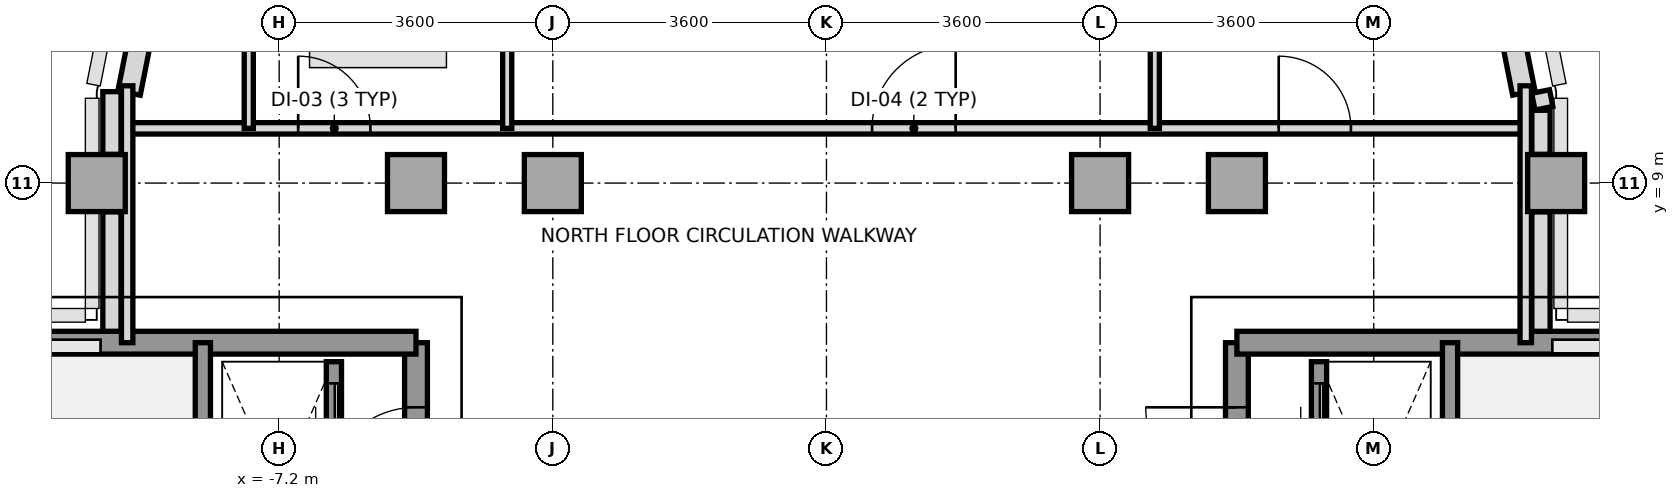
"""IFC4 building model, lengths in metres.
Left out: names, types, materials, properties, quantities, classifications, styles, units other than length and angle.
Written with IfcOpenShell. Run it as: python <this file> out.ifc"""

import sys

from ifc_helpers import new_model, si_unit, direction, frame, frame_2d, origin, origin_2d, place, context, subcontext, project, spatial, rectangle, extrude, source, transform, mapped, element, fill, save


model = new_model("IFC4")
c1 = context("Model", 3, precision=1e-05, world=origin(), true_north=direction((0.0, 1.0)))
c2 = subcontext(c1, "Body", "Model", "MODEL_VIEW")
j1 = project(units=[si_unit("LENGTHUNIT", "METRE"), si_unit("PLANEANGLEUNIT", "RADIAN")], contexts=[c1])
p1 = place(None, origin())
s1 = spatial("IfcSite", under=j1, at=p1, CompositionType="ELEMENT")
p2 = place(p1, origin())
s2 = spatial("IfcBuilding", under=s1, at=p2, CompositionType="ELEMENT")
p3 = place(p2, frame((0.0, 0.0, 258.8)))
s3 = spatial("IfcBuildingStorey", under=s2, at=p3, CompositionType="ELEMENT", Elevation=258.8)
m1 = source(origin(), c2, "Body", "SweptSolid", [
    extrude(rectangle(XDim=0.75, YDim=0.75, at=origin_2d()), origin(), (0.0, 0.0, 1.0), 3.01),
])
for number, where, z_axis, x_axis in (
    (1, (-9.6, 9.0, 0.0), (0.0, 0.0, 1.0), (1.0, 0.0, 0.0)),
    (2, (-5.4, 9.0, 0.0), (0.0, 0.0, 1.0), (1.0, 0.0, 0.0)),
    (3, (-3.6, 9.0, 0.0), (0.0, 0.0, 1.0), (1.0, 0.0, 0.0)),
    (4, (3.6, 9.0, 0.0), (0.0, 0.0, 1.0), (1.0, 0.0, 0.0)),
    (5, (5.4, 9.0, 0.0), (0.0, 0.0, 1.0), (1.0, 0.0, 0.0)),
    (6, (9.6, 9.0, 0.0), (0.0, 0.0, 1.0), (1.0, 0.0, 0.0)),
):
    element("IfcColumn", number, at=place(p3, frame(where, z_axis=z_axis, x_axis=x_axis)), inside=s3, PredefinedType="COLUMN", context=c2, shape_type="MappedRepresentation", body=[
        mapped(m1, transform((0.0, 0.0, 0.0), x_axis=(1.0, 0.0, 0.0), y_axis=(0.0, 1.0, 0.0), z_axis=(0.0, 0.0, 1.0), scale=1.0)),
    ])
for number, where, z_axis, x_axis in (
    (7, (9.175, 10.185, 0.0), (0.0, 0.0, 1.0), (-0.195, 0.981, 0.0)),
    (8, (-8.471, 13.725, 0.0), (0.0, 0.0, 1.0), (-0.195, -0.981, 0.0)),
):
    element("IfcWall", number, at=place(p3, frame(where, z_axis=z_axis, x_axis=x_axis)), inside=s3, PredefinedType="SOLIDWALL", context=c2, shape_type="SweptSolid", body=[
        extrude(rectangle(XDim=3.609, YDim=0.3, at=frame_2d((1.804, 0.0))), origin(), (0.0, 0.0, 1.0), 3.01),
    ])
p4 = place(p3, frame((-9.4, 6.953, 0.0), z_axis=(0.0, 0.0, 1.0), x_axis=(0.0, 1.0, 0.0)))
e9 = element("IfcWall", 9, at=p4, inside=s3, PredefinedType="PARAPET", context=c2, shape_type="SweptSolid", body=[
    extrude(rectangle(XDim=1.669, YDim=0.24, at=frame_2d((0.834, 0.0))), origin(), (0.0, 0.0, 1.0), 1.15),
])
p5 = place(p3, frame((-9.4, 9.378, 0.0), z_axis=(0.0, 0.0, 1.0), x_axis=(0.0, 1.0, 0.0)))
e10 = element("IfcWall", 10, at=p5, inside=s3, PredefinedType="PARAPET", context=c2, shape_type="SweptSolid", body=[
    extrude(rectangle(XDim=0.825, YDim=0.24, at=frame_2d((0.413, 0.0))), origin(), (0.0, 0.0, 1.0), 1.15),
])
p6 = place(p3, frame((9.395, 10.204, 0.0), z_axis=(0.0, 0.0, 1.0), x_axis=(0.194859894132, -0.980831087221, 0.0)))
e11 = element("IfcWall", 11, at=p6, inside=s3, PredefinedType="PARAPET", context=c2, shape_type="SweptSolid", body=[
    extrude(rectangle(XDim=0.224, YDim=0.24, at=frame_2d((0.112, 0.0))), origin(), (0.0, 0.0, 1.0), 1.15),
])
p7 = place(p3, frame((9.4, 9.958, 0.0), z_axis=(0.0, 0.0, 1.0), x_axis=(0.0, -1.0, 0.0)))
e12 = element("IfcWall", 12, at=p7, inside=s3, PredefinedType="PARAPET", context=c2, shape_type="SweptSolid", body=[
    extrude(rectangle(XDim=0.58, YDim=0.24, at=frame_2d((0.29, 0.0))), origin(), (0.0, 0.0, 1.0), 1.15),
])
p8 = place(p3, frame((9.4, 8.622, 0.0), z_axis=(0.0, 0.0, 1.0), x_axis=(0.0, -1.0, 0.0)))
e13 = element("IfcWall", 13, at=p8, inside=s3, PredefinedType="PARAPET", context=c2, shape_type="SweptSolid", body=[
    extrude(rectangle(XDim=1.669, YDim=0.24, at=frame_2d((0.834, 0.0))), origin(), (0.0, 0.0, 1.0), 1.15),
])
p9 = place(p3, frame((-5.4, -5.6, 0.0), z_axis=(0.0, 0.0, 1.0), x_axis=(0.0, 1.0, 0.0)))
e14 = element("IfcWall", 14, at=p9, inside=s3, PredefinedType="SHEAR", context=c2, shape_type="SweptSolid", body=[
    extrude(rectangle(XDim=12.5, YDim=0.3, at=frame_2d((6.25, 0.0))), origin(), (0.0, 0.0, 1.0), 3.01),
])
p10 = place(p9, frame((4.55, 0.0, 0.0)))
e15 = element("IfcOpeningElement", 15, at=p10, cuts=e14, PredefinedType="OPENING", context=c2, shape_type="SweptSolid", body=[
    extrude(rectangle(XDim=1.2, YDim=2.2, at=frame_2d((0.6, 1.1))), frame((0.0, 0.16, 0.0), z_axis=(0.0, -1.0, 0.0), x_axis=(1.0, 0.0, 0.0)), (0.0, 0.0, 1.0), 0.32),
])
p11 = place(p9, frame((10.45, 0.0, 0.0)))
e16 = element("IfcOpeningElement", 16, at=p11, cuts=e14, PredefinedType="OPENING", context=c2, shape_type="SweptSolid", body=[
    extrude(rectangle(XDim=1.2, YDim=2.2, at=frame_2d((0.6, 1.1))), frame((0.0, 0.16, 0.0), z_axis=(0.0, -1.0, 0.0), x_axis=(1.0, 0.0, 0.0)), (0.0, 0.0, 1.0), 0.32),
])
p12 = place(p9, frame((6.86, 0.0, 0.0)))
e17 = element("IfcOpeningElement", 17, at=p12, cuts=e14, PredefinedType="OPENING", context=c2, shape_type="SweptSolid", body=[
    extrude(rectangle(XDim=0.8, YDim=2.1, at=frame_2d((0.4, 1.05))), frame((0.0, 0.16, 0.0), z_axis=(0.0, -1.0, 0.0), x_axis=(1.0, 0.0, 0.0)), (0.0, 0.0, 1.0), 0.32),
])
p13 = place(p3, frame((-12.35, 6.9, 0.0), z_axis=(0.0, 0.0, 1.0), x_axis=(1.0, 0.0, 0.0)))
e18 = element("IfcWall", 18, at=p13, inside=s3, PredefinedType="SHEAR", context=c2, shape_type="SweptSolid", body=[
    extrude(rectangle(XDim=6.95, YDim=0.3, at=frame_2d((3.475, 0.0))), origin(), (0.0, 0.0, 1.0), 3.01),
])
p14 = place(p3, frame((-8.204, -0.016, 0.0), z_axis=(0.0, 0.0, 1.0), x_axis=(0.0, 1.0, 0.0)))
e19 = element("IfcWall", 19, at=p14, inside=s3, PredefinedType="SOLIDWALL", context=c2, shape_type="SweptSolid", body=[
    extrude(rectangle(XDim=6.916, YDim=0.2, at=frame_2d((3.458, 0.0))), origin(), (0.0, 0.0, 1.0), 3.01),
])
p15 = place(p14, frame((0.2, 0.0, 0.0)))
e20 = element("IfcOpeningElement", 20, at=p15, cuts=e19, PredefinedType="OPENING", context=c2, shape_type="SweptSolid", body=[
    extrude(rectangle(XDim=1.2, YDim=2.2, at=frame_2d((0.6, 1.1))), frame((0.0, 0.11, 0.0), z_axis=(0.0, -1.0, 0.0), x_axis=(1.0, 0.0, 0.0)), (0.0, 0.0, 1.0), 0.22),
])
p16 = place(p3, frame((5.4, -5.6, 0.0), z_axis=(0.0, 0.0, 1.0), x_axis=(0.0, 1.0, 0.0)))
e21 = element("IfcWall", 21, at=p16, inside=s3, PredefinedType="SHEAR", context=c2, shape_type="SweptSolid", body=[
    extrude(rectangle(XDim=12.5, YDim=0.3, at=frame_2d((6.25, 0.0))), origin(), (0.0, 0.0, 1.0), 3.01),
])
p17 = place(p16, frame((4.55, 0.0, 0.0)))
e22 = element("IfcOpeningElement", 22, at=p17, cuts=e21, PredefinedType="OPENING", context=c2, shape_type="SweptSolid", body=[
    extrude(rectangle(XDim=1.2, YDim=2.2, at=frame_2d((0.6, 1.1))), frame((0.0, 0.16, 0.0), z_axis=(0.0, -1.0, 0.0), x_axis=(1.0, 0.0, 0.0)), (0.0, 0.0, 1.0), 0.32),
])
p18 = place(p16, frame((10.45, 0.0, 0.0)))
e23 = element("IfcOpeningElement", 23, at=p18, cuts=e21, PredefinedType="OPENING", context=c2, shape_type="SweptSolid", body=[
    extrude(rectangle(XDim=1.2, YDim=2.2, at=frame_2d((0.6, 1.1))), frame((0.0, 0.16, 0.0), z_axis=(0.0, -1.0, 0.0), x_axis=(1.0, 0.0, 0.0)), (0.0, 0.0, 1.0), 0.32),
])
p19 = place(p16, frame((6.86, 0.0, 0.0)))
e24 = element("IfcOpeningElement", 24, at=p19, cuts=e21, PredefinedType="OPENING", context=c2, shape_type="SweptSolid", body=[
    extrude(rectangle(XDim=0.8, YDim=2.1, at=frame_2d((0.4, 1.05))), frame((0.0, 0.16, 0.0), z_axis=(0.0, -1.0, 0.0), x_axis=(1.0, 0.0, 0.0)), (0.0, 0.0, 1.0), 0.32),
])
p20 = place(p16, frame((7.88, 0.0, 0.0)))
e25 = element("IfcOpeningElement", 25, at=p20, cuts=e21, PredefinedType="OPENING", context=c2, shape_type="SweptSolid", body=[
    extrude(rectangle(XDim=0.8, YDim=2.1, at=frame_2d((0.4, 1.05))), frame((0.0, 0.16, 0.0), z_axis=(0.0, -1.0, 0.0), x_axis=(1.0, 0.0, 0.0)), (0.0, 0.0, 1.0), 0.32),
])
p21 = place(p3, frame((5.4, 6.9, 0.0), z_axis=(0.0, 0.0, 1.0), x_axis=(1.0, 0.0, 0.0)))
e26 = element("IfcWall", 26, at=p21, inside=s3, PredefinedType="SHEAR", context=c2, shape_type="SweptSolid", body=[
    extrude(rectangle(XDim=6.95, YDim=0.3, at=frame_2d((3.475, 0.0))), origin(), (0.0, 0.0, 1.0), 3.01),
])
p22 = place(p3, frame((8.204, -0.016, 0.0), z_axis=(0.0, 0.0, 1.0), x_axis=(0.0, 1.0, 0.0)))
e27 = element("IfcWall", 27, at=p22, inside=s3, PredefinedType="SOLIDWALL", context=c2, shape_type="SweptSolid", body=[
    extrude(rectangle(XDim=6.916, YDim=0.2, at=frame_2d((3.458, 0.0))), origin(), (0.0, 0.0, 1.0), 3.01),
])
p23 = place(p22, frame((0.2, 0.0, 0.0)))
e28 = element("IfcOpeningElement", 28, at=p23, cuts=e27, PredefinedType="OPENING", context=c2, shape_type="SweptSolid", body=[
    extrude(rectangle(XDim=1.2, YDim=2.2, at=frame_2d((0.6, 1.1))), frame((0.0, 0.11, 0.0), z_axis=(0.0, -1.0, 0.0), x_axis=(1.0, 0.0, 0.0)), (0.0, 0.0, 1.0), 0.22),
])
p24 = place(p3, frame((-6.48, 4.98, 0.0), z_axis=(0.0, 0.0, 1.0), x_axis=(0.0, 1.0, 0.0)))
e29 = element("IfcWall", 29, at=p24, inside=s3, PredefinedType="SOLIDWALL", context=c2, shape_type="SweptSolid", body=[
    extrude(rectangle(XDim=1.67, YDim=0.2, at=frame_2d((0.835, 0.0))), origin(), (0.0, 0.0, 1.0), 3.01),
])
p25 = place(p24, frame((0.285, 0.0, 0.0)))
e30 = element("IfcOpeningElement", 30, at=p25, cuts=e29, PredefinedType="OPENING", context=c2, shape_type="SweptSolid", body=[
    extrude(rectangle(XDim=1.1, YDim=2.2, at=frame_2d((0.55, 1.1))), frame((0.0, 0.11, 0.0), z_axis=(0.0, -1.0, 0.0), x_axis=(1.0, 0.0, 0.0)), (0.0, 0.0, 1.0), 0.22),
])
p26 = place(p3, frame((6.48, 4.98, 0.0), z_axis=(0.0, 0.0, 1.0), x_axis=(0.0, 1.0, 0.0)))
e31 = element("IfcWall", 31, at=p26, inside=s3, PredefinedType="SOLIDWALL", context=c2, shape_type="SweptSolid", body=[
    extrude(rectangle(XDim=1.67, YDim=0.2, at=frame_2d((0.835, 0.0))), origin(), (0.0, 0.0, 1.0), 3.01),
])
p27 = place(p26, frame((0.285, 0.0, 0.0)))
e32 = element("IfcOpeningElement", 32, at=p27, cuts=e31, PredefinedType="OPENING", context=c2, shape_type="SweptSolid", body=[
    extrude(rectangle(XDim=1.1, YDim=2.2, at=frame_2d((0.55, 1.1))), frame((0.0, 0.11, 0.0), z_axis=(0.0, -1.0, 0.0), x_axis=(1.0, 0.0, 0.0)), (0.0, 0.0, 1.0), 0.22),
])
p28 = place(p3, frame((-9.2, 9.72, 0.0), z_axis=(0.0, 0.0, 1.0), x_axis=(1.0, 0.0, 0.0)))
e33 = element("IfcWall", 33, at=p28, inside=s3, PredefinedType="PARTITIONING", context=c2, shape_type="SweptSolid", body=[
    extrude(rectangle(XDim=18.4, YDim=0.15, at=frame_2d((9.2, 0.0))), origin(), (0.0, 0.0, 1.0), 3.01),
])
p29 = place(p28, frame((2.25, 0.0, 0.0)))
e34 = element("IfcOpeningElement", 34, at=p29, cuts=e33, PredefinedType="OPENING", context=c2, shape_type="SweptSolid", body=[
    extrude(rectangle(XDim=0.95, YDim=2.15, at=frame_2d((0.475, 1.075))), frame((0.0, 0.085, 0.0), z_axis=(0.0, -1.0, 0.0), x_axis=(1.0, 0.0, 0.0)), (0.0, 0.0, 1.0), 0.17),
])
p30 = place(p28, frame((9.8, 0.0, 0.0)))
e35 = element("IfcOpeningElement", 35, at=p30, cuts=e33, PredefinedType="OPENING", context=c2, shape_type="SweptSolid", body=[
    extrude(rectangle(XDim=1.1, YDim=2.2, at=frame_2d((0.55, 1.1))), frame((0.0, 0.085, 0.0), z_axis=(0.0, -1.0, 0.0), x_axis=(1.0, 0.0, 0.0)), (0.0, 0.0, 1.0), 0.17),
])
p31 = place(p28, frame((15.15, 0.0, 0.0)))
e36 = element("IfcOpeningElement", 36, at=p31, cuts=e33, PredefinedType="OPENING", context=c2, shape_type="SweptSolid", body=[
    extrude(rectangle(XDim=0.95, YDim=2.15, at=frame_2d((0.475, 1.075))), frame((0.0, 0.085, 0.0), z_axis=(0.0, -1.0, 0.0), x_axis=(1.0, 0.0, 0.0)), (0.0, 0.0, 1.0), 0.17),
])
for number, where, z_axis, x_axis in (
    (37, (-9.2, 6.9, 0.0), (0.0, 0.0, 1.0), (0.0, 1.0, 0.0)),
    (38, (9.2, 6.9, 0.0), (0.0, 0.0, 1.0), (0.0, 1.0, 0.0)),
):
    element("IfcWall", number, at=place(p3, frame(where, z_axis=z_axis, x_axis=x_axis)), inside=s3, PredefinedType="PARTITIONING", context=c2, shape_type="SweptSolid", body=[
        extrude(rectangle(XDim=3.38, YDim=0.15, at=frame_2d((1.69, 0.0))), origin(), (0.0, 0.0, 1.0), 2.61),
    ])
p32 = place(p3, frame((4.32, 9.72, 0.0), z_axis=(0.0, 0.0, 1.0), x_axis=(0.0, 1.0, 0.0)))
e39 = element("IfcWall", 39, at=p32, inside=s3, PredefinedType="PARTITIONING", context=c2, shape_type="SweptSolid", body=[
    extrude(rectangle(XDim=9.53, YDim=0.12, at=frame_2d((4.765, 0.0))), origin(), (0.0, 0.0, 1.0), 2.61),
])
for number, where, z_axis, x_axis in (
    (40, (-7.6, 9.72, 0.0), (0.0, 0.0, 1.0), (0.0, 1.0, 0.0)),
    (41, (-4.2, 9.72, 0.0), (0.0, 0.0, 1.0), (0.0, 1.0, 0.0)),
):
    element("IfcWall", number, at=place(p3, frame(where, z_axis=z_axis, x_axis=x_axis)), inside=s3, PredefinedType="PARTITIONING", context=c2, shape_type="SweptSolid", body=[
        extrude(rectangle(XDim=3.4, YDim=0.12, at=frame_2d((1.7, 0.0))), origin(), (0.0, 0.0, 1.0), 3.01),
    ])
m2 = source(origin(), c2, "Body", "SweptSolid", [
    extrude(rectangle(XDim=1.2, YDim=2.2, at=frame_2d((0.6, 1.1))), frame((0.0, 0.025, 0.0), z_axis=(0.0, -1.0, 0.0), x_axis=(1.0, 0.0, 0.0)), (0.0, 0.0, 1.0), 0.05),
])
p33 = place(p11, origin())
e42 = element("IfcDoor", 42, at=p33, inside=s3, OperationType="SINGLE_SWING_LEFT", PredefinedType="DOOR", context=c2, shape_type="MappedRepresentation", body=[
    mapped(m2, transform((0.0, 0.0, 0.0), x_axis=(1.0, 0.0, 0.0), y_axis=(0.0, 1.0, 0.0), z_axis=(0.0, 0.0, 1.0), scale=1.0)),
])
fill(e16, e42)
p34 = place(p18, origin())
e43 = element("IfcDoor", 43, at=p34, inside=s3, OperationType="SINGLE_SWING_RIGHT", PredefinedType="DOOR", context=c2, shape_type="MappedRepresentation", body=[
    mapped(m2, transform((0.0, 0.0, 0.0), x_axis=(1.0, 0.0, 0.0), y_axis=(0.0, 1.0, 0.0), z_axis=(0.0, 0.0, 1.0), scale=1.0)),
])
fill(e23, e43)
m3 = source(origin(), c2, "Body", "SweptSolid", [
    extrude(rectangle(XDim=1.1, YDim=2.2, at=frame_2d((0.55, 1.1))), frame((0.0, 0.025, 0.0), z_axis=(0.0, -1.0, 0.0), x_axis=(1.0, 0.0, 0.0)), (0.0, 0.0, 1.0), 0.05),
])
p35 = place(p25, origin())
e44 = element("IfcDoor", 44, at=p35, inside=s3, OperationType="SLIDING_TO_LEFT", PredefinedType="DOOR", context=c2, shape_type="MappedRepresentation", body=[
    mapped(m3, transform((0.0, 0.0, 0.0), x_axis=(1.0, 0.0, 0.0), y_axis=(0.0, 1.0, 0.0), z_axis=(0.0, 0.0, 1.0), scale=1.0)),
])
fill(e30, e44)
p36 = place(p27, origin())
e45 = element("IfcDoor", 45, at=p36, inside=s3, OperationType="SLIDING_TO_LEFT", PredefinedType="DOOR", context=c2, shape_type="MappedRepresentation", body=[
    mapped(m3, transform((0.0, 0.0, 0.0), x_axis=(1.0, 0.0, 0.0), y_axis=(0.0, 1.0, 0.0), z_axis=(0.0, 0.0, 1.0), scale=1.0)),
])
fill(e32, e45)
m4 = source(origin(), c2, "Body", "SweptSolid", [
    extrude(rectangle(XDim=0.95, YDim=2.15, at=frame_2d((0.475, 1.075))), frame((0.0, 0.025, 0.0), z_axis=(0.0, -1.0, 0.0), x_axis=(1.0, 0.0, 0.0)), (0.0, 0.0, 1.0), 0.05),
])
p37 = place(p29, origin())
e46 = element("IfcDoor", 46, at=p37, inside=s3, OperationType="SINGLE_SWING_LEFT", PredefinedType="DOOR", context=c2, shape_type="MappedRepresentation", body=[
    mapped(m4, transform((0.0, 0.0, 0.0), x_axis=(1.0, 0.0, 0.0), y_axis=(0.0, 1.0, 0.0), z_axis=(0.0, 0.0, 1.0), scale=1.0)),
])
fill(e34, e46)
p38 = place(p30, origin())
e47 = element("IfcDoor", 47, at=p38, inside=s3, OperationType="SINGLE_SWING_RIGHT", PredefinedType="DOOR", context=c2, shape_type="MappedRepresentation", body=[
    mapped(m3, transform((0.0, 0.0, 0.0), x_axis=(1.0, 0.0, 0.0), y_axis=(0.0, 1.0, 0.0), z_axis=(0.0, 0.0, 1.0), scale=1.0)),
])
fill(e35, e47)
p39 = place(p31, origin())
e48 = element("IfcDoor", 48, at=p39, inside=s3, OperationType="SINGLE_SWING_LEFT", PredefinedType="DOOR", context=c2, shape_type="MappedRepresentation", body=[
    mapped(m4, transform((0.0, 0.0, 0.0), x_axis=(1.0, 0.0, 0.0), y_axis=(0.0, 1.0, 0.0), z_axis=(0.0, 0.0, 1.0), scale=1.0)),
])
fill(e36, e48)
save(model, sys.argv[1])
